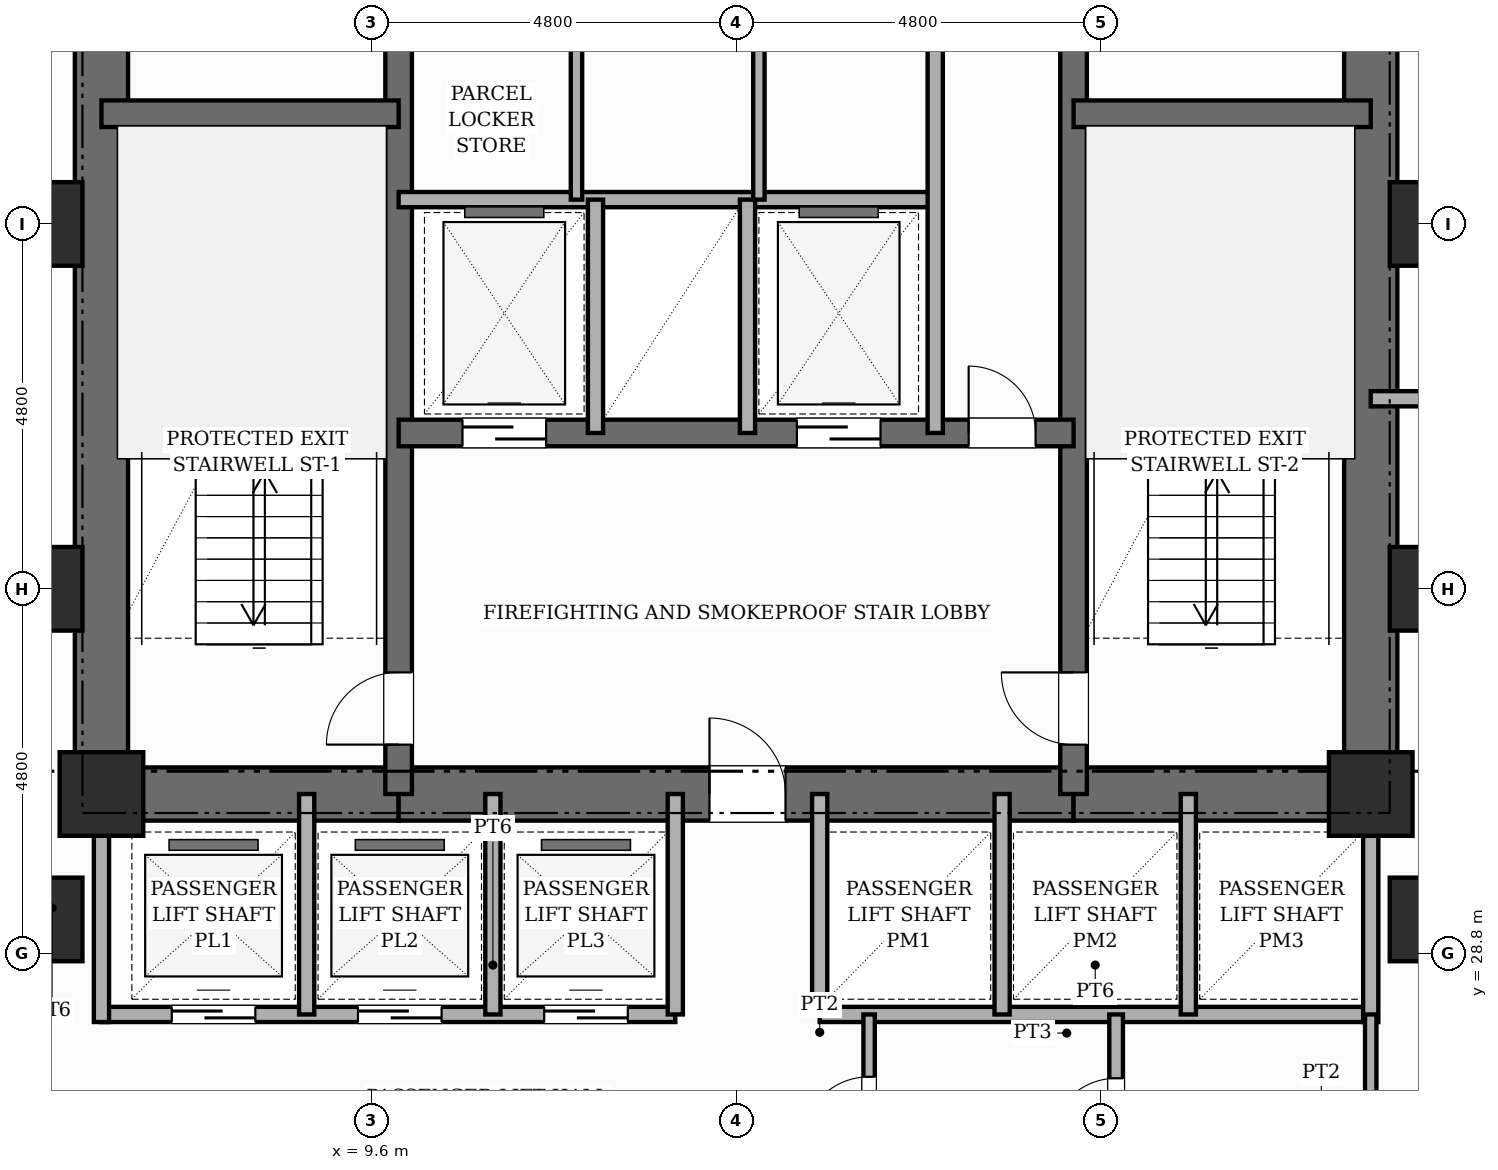
"""IFC4 building model, lengths in metres.
Left out: names, types, materials, properties, quantities, classifications, styles, units other than length and angle.
Written with IfcOpenShell. Run it as: python <this file> out.ifc"""

import sys

from ifc_helpers import new_model, si_unit, direction, frame, frame_2d, origin, origin_2d, place, context, subcontext, project, spatial, rectangle, extrude, element, fill, save


model = new_model("IFC4")
c1 = context("Model", 3, precision=1e-05, world=origin(), true_north=direction((0.0, 1.0)))
c2 = subcontext(c1, "Body", "Model", "MODEL_VIEW")
j1 = project(units=[si_unit("LENGTHUNIT", "METRE"), si_unit("PLANEANGLEUNIT", "RADIAN")], contexts=[c1])
p1 = place(None, origin())
s1 = spatial("IfcSite", under=j1, at=p1, CompositionType="ELEMENT")
p2 = place(p1, origin())
s2 = spatial("IfcBuilding", under=s1, at=p2, CompositionType="ELEMENT")
p3 = place(p2, frame((0.0, 0.0, 25.0)))
s3 = spatial("IfcBuildingStorey", under=s2, at=p3, CompositionType="ELEMENT", Elevation=25.0)
p4 = place(p3, frame((6.05, 30.55, 0.0), z_axis=(0.0, 0.0, 1.0), x_axis=(0.0, 1.0, 0.0)))
e1 = element("IfcWall", 1, at=p4, inside=s3, PredefinedType="SHEAR", context=c2, shape_type="SweptSolid", body=[
    extrude(rectangle(XDim=15.6, YDim=0.7, at=frame_2d((7.8, 0.0))), origin(), (0.0, 0.0, 1.0), 3.6),
])
p5 = place(p3, frame((22.75, 30.55, 0.0), z_axis=(0.0, 0.0, 1.0), x_axis=(0.0, 1.0, 0.0)))
e2 = element("IfcWall", 2, at=p5, inside=s3, PredefinedType="SHEAR", context=c2, shape_type="SweptSolid", body=[
    extrude(rectangle(XDim=15.6, YDim=0.7, at=frame_2d((7.8, 0.0))), origin(), (0.0, 0.0, 1.0), 3.6),
])
p6 = place(p5, frame((10.8, 0.0, 0.0)))
e3 = element("IfcOpeningElement", 3, at=p6, cuts=e2, PredefinedType="OPENING", context=c2, shape_type="SweptSolid", body=[
    extrude(rectangle(XDim=1.0, YDim=2.15, at=frame_2d((0.5, 1.075))), frame((0.0, 0.36, 0.0), z_axis=(0.0, -1.0, 0.0), x_axis=(1.0, 0.0, 0.0)), (0.0, 0.0, 1.0), 0.72),
])
p7 = place(p3, frame((6.05, 30.9, 0.0), z_axis=(0.0, 0.0, 1.0), x_axis=(1.0, 0.0, 0.0)))
e4 = element("IfcWall", 4, at=p7, inside=s3, PredefinedType="SHEAR", context=c2, shape_type="SweptSolid", body=[
    extrude(rectangle(XDim=3.91, YDim=0.7, at=frame_2d((1.955, 0.0))), origin(), (0.0, 0.0, 1.0), 3.6),
])
p8 = place(p3, frame((9.96, 30.9, 0.0), z_axis=(0.0, 0.0, 1.0), x_axis=(1.0, 0.0, 0.0)))
e5 = element("IfcWall", 5, at=p8, inside=s3, PredefinedType="SHEAR", context=c2, shape_type="SweptSolid", body=[
    extrude(rectangle(XDim=8.88, YDim=0.7, at=frame_2d((4.44, 0.0))), origin(), (0.0, 0.0, 1.0), 3.6),
])
p9 = place(p8, frame((4.09, 0.0, 0.0)))
e6 = element("IfcOpeningElement", 6, at=p9, cuts=e5, PredefinedType="OPENING", context=c2, shape_type="SweptSolid", body=[
    extrude(rectangle(XDim=1.0, YDim=2.15, at=frame_2d((0.5, 1.075))), frame((0.0, 0.36, 0.0), z_axis=(0.0, -1.0, 0.0), x_axis=(1.0, 0.0, 0.0)), (0.0, 0.0, 1.0), 0.72),
])
p10 = place(p3, frame((18.84, 30.9, 0.0), z_axis=(0.0, 0.0, 1.0), x_axis=(1.0, 0.0, 0.0)))
e7 = element("IfcWall", 7, at=p10, inside=s3, PredefinedType="SHEAR", context=c2, shape_type="SweptSolid", body=[
    extrude(rectangle(XDim=3.91, YDim=0.7, at=frame_2d((1.955, 0.0))), origin(), (0.0, 0.0, 1.0), 3.6),
])
p11 = place(p3, frame((9.96, 30.9, 0.0), z_axis=(0.0, 0.0, 1.0), x_axis=(0.0, 1.0, 0.0)))
e8 = element("IfcWall", 8, at=p11, inside=s3, PredefinedType="SHEAR", context=c2, shape_type="SweptSolid", body=[
    extrude(rectangle(XDim=14.9, YDim=0.35, at=frame_2d((7.45, 0.0))), origin(), (0.0, 0.0, 1.0), 3.6),
])
p12 = place(p11, frame((0.65, 0.0, 0.0)))
e9 = element("IfcOpeningElement", 9, at=p12, cuts=e8, PredefinedType="OPENING", context=c2, shape_type="SweptSolid", body=[
    extrude(rectangle(XDim=0.95, YDim=2.1, at=frame_2d((0.475, 1.05))), frame((0.0, 0.185, 0.0), z_axis=(0.0, -1.0, 0.0), x_axis=(1.0, 0.0, 0.0)), (0.0, 0.0, 1.0), 0.37),
])
p13 = place(p11, frame((10.45, 0.0, 0.0)))
e10 = element("IfcOpeningElement", 10, at=p13, cuts=e8, PredefinedType="OPENING", context=c2, shape_type="SweptSolid", body=[
    extrude(rectangle(XDim=1.0, YDim=2.15, at=frame_2d((0.5, 1.075))), frame((0.0, 0.185, 0.0), z_axis=(0.0, -1.0, 0.0), x_axis=(1.0, 0.0, 0.0)), (0.0, 0.0, 1.0), 0.37),
])
p14 = place(p3, frame((18.84, 30.9, 0.0), z_axis=(0.0, 0.0, 1.0), x_axis=(0.0, 1.0, 0.0)))
e11 = element("IfcWall", 11, at=p14, inside=s3, PredefinedType="SHEAR", context=c2, shape_type="SweptSolid", body=[
    extrude(rectangle(XDim=14.9, YDim=0.35, at=frame_2d((7.45, 0.0))), origin(), (0.0, 0.0, 1.0), 3.6),
])
p15 = place(p14, frame((0.65, 0.0, 0.0)))
e12 = element("IfcOpeningElement", 12, at=p15, cuts=e11, PredefinedType="OPENING", context=c2, shape_type="SweptSolid", body=[
    extrude(rectangle(XDim=0.95, YDim=2.1, at=frame_2d((0.475, 1.05))), frame((0.0, 0.185, 0.0), z_axis=(0.0, -1.0, 0.0), x_axis=(1.0, 0.0, 0.0)), (0.0, 0.0, 1.0), 0.37),
])
p16 = place(p14, frame((10.45, 0.0, 0.0)))
e13 = element("IfcOpeningElement", 13, at=p16, cuts=e11, PredefinedType="OPENING", context=c2, shape_type="SweptSolid", body=[
    extrude(rectangle(XDim=1.0, YDim=2.15, at=frame_2d((0.5, 1.075))), frame((0.0, 0.185, 0.0), z_axis=(0.0, -1.0, 0.0), x_axis=(1.0, 0.0, 0.0)), (0.0, 0.0, 1.0), 0.37),
])
for number, where, z_axis, x_axis in (
    (14, (6.05, 39.85, 0.0), (0.0, 0.0, 1.0), (1.0, 0.0, 0.0)),
    (15, (18.84, 39.85, 0.0), (0.0, 0.0, 1.0), (1.0, 0.0, 0.0)),
):
    element("IfcWall", number, at=place(p3, frame(where, z_axis=z_axis, x_axis=x_axis)), inside=s3, PredefinedType="SHEAR", context=c2, shape_type="SweptSolid", body=[
        extrude(rectangle(XDim=3.91, YDim=0.35, at=frame_2d((1.955, 0.0))), origin(), (0.0, 0.0, 1.0), 3.6),
    ])
p17 = place(p3, frame((9.96, 35.65, 0.0), z_axis=(0.0, 0.0, 1.0), x_axis=(1.0, 0.0, 0.0)))
e16 = element("IfcWall", 16, at=p17, inside=s3, PredefinedType="SHEAR", context=c2, shape_type="SweptSolid", body=[
    extrude(rectangle(XDim=8.88, YDim=0.35, at=frame_2d((4.44, 0.0))), origin(), (0.0, 0.0, 1.0), 3.6),
])
p18 = place(p17, frame((0.84, 0.0, 0.0)))
e17 = element("IfcOpeningElement", 17, at=p18, cuts=e16, PredefinedType="OPENING", context=c2, shape_type="SweptSolid", body=[
    extrude(rectangle(XDim=1.1, YDim=2.15, at=frame_2d((0.55, 1.075))), frame((0.0, 0.185, 0.0), z_axis=(0.0, -1.0, 0.0), x_axis=(1.0, 0.0, 0.0)), (0.0, 0.0, 1.0), 0.37),
])
p19 = place(p17, frame((5.24, 0.0, 0.0)))
e18 = element("IfcOpeningElement", 18, at=p19, cuts=e16, PredefinedType="OPENING", context=c2, shape_type="SweptSolid", body=[
    extrude(rectangle(XDim=1.1, YDim=2.15, at=frame_2d((0.55, 1.075))), frame((0.0, 0.185, 0.0), z_axis=(0.0, -1.0, 0.0), x_axis=(1.0, 0.0, 0.0)), (0.0, 0.0, 1.0), 0.37),
])
p20 = place(p17, frame((7.5, 0.0, 0.0)))
e19 = element("IfcOpeningElement", 19, at=p20, cuts=e16, PredefinedType="OPENING", context=c2, shape_type="SweptSolid", body=[
    extrude(rectangle(XDim=0.88, YDim=2.1, at=frame_2d((0.44, 1.05))), frame((0.0, 0.185, 0.0), z_axis=(0.0, -1.0, 0.0), x_axis=(1.0, 0.0, 0.0)), (0.0, 0.0, 1.0), 0.37),
])
for number, where, z_axis, x_axis in (
    (20, (5.25, 29.25, 0.0), (0.0, 0.0, 1.0), (1.0, 0.0, 0.0)),
    (21, (5.25, 33.6, 0.0), (0.0, 0.0, 1.0), (1.0, 0.0, 0.0)),
    (22, (5.25, 38.4, 0.0), (0.0, 0.0, 1.0), (1.0, 0.0, 0.0)),
    (23, (6.05, 30.9, 0.0), (0.0, 0.0, 1.0), (1.0, 0.0, 0.0)),
    (24, (22.75, 30.9, 0.0), (0.0, 0.0, 1.0), (1.0, 0.0, 0.0)),
    (25, (23.55, 29.25, 0.0), (0.0, 0.0, 1.0), (1.0, 0.0, 0.0)),
    (26, (23.55, 33.6, 0.0), (0.0, 0.0, 1.0), (1.0, 0.0, 0.0)),
    (27, (23.55, 38.4, 0.0), (0.0, 0.0, 1.0), (1.0, 0.0, 0.0)),
):
    element("IfcColumn", number, at=place(p3, frame(where, z_axis=z_axis, x_axis=x_axis)), inside=s3, PredefinedType="COLUMN", context=c2, shape_type="SweptSolid", body=[
        extrude(rectangle(XDim=1.1, YDim=1.1, at=origin_2d()), origin(), (0.0, 0.0, 1.0), 3.6),
    ])
p21 = place(p3, frame((9.96, 38.72, 0.0), z_axis=(0.0, 0.0, 1.0), x_axis=(1.0, 0.0, 0.0)))
e28 = element("IfcWall", 28, at=p21, inside=s3, PredefinedType="POLYGONAL", context=c2, shape_type="SweptSolid", body=[
    extrude(rectangle(XDim=7.06, YDim=0.2, at=frame_2d((3.53, 0.0))), origin(), (0.0, 0.0, 1.0), 3.35),
])
for number, where, z_axis, x_axis in (
    (29, (12.55, 35.65, 0.0), (0.0, 0.0, 1.0), (0.0, 1.0, 0.0)),
    (30, (14.55, 35.65, 0.0), (0.0, 0.0, 1.0), (0.0, 1.0, 0.0)),
):
    element("IfcWall", number, at=place(p3, frame(where, z_axis=z_axis, x_axis=x_axis)), inside=s3, PredefinedType="POLYGONAL", context=c2, shape_type="SweptSolid", body=[
        extrude(rectangle(XDim=3.07, YDim=0.2, at=frame_2d((1.535, 0.0))), origin(), (0.0, 0.0, 1.0), 3.35),
    ])
p22 = place(p3, frame((17.02, 35.65, 0.0), z_axis=(0.0, 0.0, 1.0), x_axis=(0.0, 1.0, 0.0)))
e31 = element("IfcWall", 31, at=p22, inside=s3, PredefinedType="POLYGONAL", context=c2, shape_type="SweptSolid", body=[
    extrude(rectangle(XDim=5.15, YDim=0.2, at=frame_2d((2.575, 0.0))), origin(), (0.0, 0.0, 1.0), 3.35),
])
for number, where, z_axis, x_axis in (
    (32, (12.3, 38.72, 0.0), (0.0, 0.0, 1.0), (0.0, 1.0, 0.0)),
    (33, (14.7, 38.72, 0.0), (0.0, 0.0, 1.0), (0.0, 1.0, 0.0)),
):
    element("IfcWall", number, at=place(p3, frame(where, z_axis=z_axis, x_axis=x_axis)), inside=s3, PredefinedType="PARTITIONING", context=c2, shape_type="SweptSolid", body=[
        extrude(rectangle(XDim=2.08, YDim=0.15, at=frame_2d((1.04, 0.0))), origin(), (0.0, 0.0, 1.0), 3.35),
    ])
p23 = place(p3, frame((6.05, 28.0, 0.0), z_axis=(0.0, 0.0, 1.0), x_axis=(1.0, 0.0, 0.0)))
e34 = element("IfcWall", 34, at=p23, inside=s3, PredefinedType="POLYGONAL", context=c2, shape_type="SweptSolid", body=[
    extrude(rectangle(XDim=7.55, YDim=0.2, at=frame_2d((3.775, 0.0))), origin(), (0.0, 0.0, 1.0), 3.35),
])
p24 = place(p23, frame((0.925, 0.0, 0.0)))
e35 = element("IfcOpeningElement", 35, at=p24, cuts=e34, PredefinedType="OPENING", context=c2, shape_type="SweptSolid", body=[
    extrude(rectangle(XDim=1.1, YDim=2.15, at=frame_2d((0.55, 1.075))), frame((0.0, 0.11, 0.0), z_axis=(0.0, -1.0, 0.0), x_axis=(1.0, 0.0, 0.0)), (0.0, 0.0, 1.0), 0.22),
])
p25 = place(p23, frame((3.375, 0.0, 0.0)))
e36 = element("IfcOpeningElement", 36, at=p25, cuts=e34, PredefinedType="OPENING", context=c2, shape_type="SweptSolid", body=[
    extrude(rectangle(XDim=1.1, YDim=2.15, at=frame_2d((0.55, 1.075))), frame((0.0, 0.11, 0.0), z_axis=(0.0, -1.0, 0.0), x_axis=(1.0, 0.0, 0.0)), (0.0, 0.0, 1.0), 0.22),
])
p26 = place(p23, frame((5.825, 0.0, 0.0)))
e37 = element("IfcOpeningElement", 37, at=p26, cuts=e34, PredefinedType="OPENING", context=c2, shape_type="SweptSolid", body=[
    extrude(rectangle(XDim=1.1, YDim=2.15, at=frame_2d((0.55, 1.075))), frame((0.0, 0.11, 0.0), z_axis=(0.0, -1.0, 0.0), x_axis=(1.0, 0.0, 0.0)), (0.0, 0.0, 1.0), 0.22),
])
p27 = place(p3, frame((15.5, 28.0, 0.0), z_axis=(0.0, 0.0, 1.0), x_axis=(1.0, 0.0, 0.0)))
e38 = element("IfcWall", 38, at=p27, inside=s3, PredefinedType="POLYGONAL", context=c2, shape_type="SweptSolid", body=[
    extrude(rectangle(XDim=7.25, YDim=0.2, at=frame_2d((3.625, 0.0))), origin(), (0.0, 0.0, 1.0), 3.35),
])
for number, where, z_axis, x_axis in (
    (39, (6.05, 27.9, 0.0), (0.0, 0.0, 1.0), (0.0, 1.0, 0.0)),
    (40, (22.75, 27.9, 0.0), (0.0, 0.0, 1.0), (0.0, 1.0, 0.0)),
):
    element("IfcWall", number, at=place(p3, frame(where, z_axis=z_axis, x_axis=x_axis)), inside=s3, PredefinedType="POLYGONAL", context=c2, shape_type="SweptSolid", body=[
        extrude(rectangle(XDim=3.0, YDim=0.2, at=frame_2d((1.5, 0.0))), origin(), (0.0, 0.0, 1.0), 3.35),
    ])
for number, where, z_axis, x_axis in (
    (41, (13.6, 28.0, 0.0), (0.0, 0.0, 1.0), (0.0, 1.0, 0.0)),
    (42, (15.5, 28.0, 0.0), (0.0, 0.0, 1.0), (0.0, 1.0, 0.0)),
    (43, (8.75, 28.0, 0.0), (0.0, 0.0, 1.0), (0.0, 1.0, 0.0)),
    (44, (11.2, 28.0, 0.0), (0.0, 0.0, 1.0), (0.0, 1.0, 0.0)),
    (45, (17.9, 28.0, 0.0), (0.0, 0.0, 1.0), (0.0, 1.0, 0.0)),
    (46, (20.35, 28.0, 0.0), (0.0, 0.0, 1.0), (0.0, 1.0, 0.0)),
):
    element("IfcWall", number, at=place(p3, frame(where, z_axis=z_axis, x_axis=x_axis)), inside=s3, PredefinedType="POLYGONAL", context=c2, shape_type="SweptSolid", body=[
        extrude(rectangle(XDim=2.9, YDim=0.2, at=frame_2d((1.45, 0.0))), origin(), (0.0, 0.0, 1.0), 3.35),
    ])
p28 = place(p3, frame((16.15, 25.75, 0.0), z_axis=(0.0, 0.0, 1.0), x_axis=(0.0, 1.0, 0.0)))
e47 = element("IfcWall", 47, at=p28, inside=s3, PredefinedType="PARTITIONING", context=c2, shape_type="SweptSolid", body=[
    extrude(rectangle(XDim=2.25, YDim=0.15, at=frame_2d((1.125, 0.0))), origin(), (0.0, 0.0, 1.0), 3.35),
])
p29 = place(p28, frame((0.55, 0.0, 0.0)))
e48 = element("IfcOpeningElement", 48, at=p29, cuts=e47, PredefinedType="OPENING", context=c2, shape_type="SweptSolid", body=[
    extrude(rectangle(XDim=0.88, YDim=2.1, at=frame_2d((0.44, 1.05))), frame((0.0, 0.085, 0.0), z_axis=(0.0, -1.0, 0.0), x_axis=(1.0, 0.0, 0.0)), (0.0, 0.0, 1.0), 0.17),
])
p30 = place(p3, frame((22.75, 25.75, 0.0), z_axis=(0.0, 0.0, 1.0), x_axis=(0.0, 1.0, 0.0)))
e49 = element("IfcWall", 49, at=p30, inside=s3, PredefinedType="PARTITIONING", context=c2, shape_type="SweptSolid", body=[
    extrude(rectangle(XDim=2.25, YDim=0.15, at=frame_2d((1.125, 0.0))), origin(), (0.0, 0.0, 1.0), 3.35),
])
p31 = place(p3, frame((19.4, 25.75, 0.0), z_axis=(0.0, 0.0, 1.0), x_axis=(0.0, 1.0, 0.0)))
e50 = element("IfcWall", 50, at=p31, inside=s3, PredefinedType="PLUMBINGWALL", context=c2, shape_type="SweptSolid", body=[
    extrude(rectangle(XDim=2.25, YDim=0.18, at=frame_2d((1.125, 0.0))), origin(), (0.0, 0.0, 1.0), 3.35),
])
p32 = place(p31, frame((0.55, 0.0, 0.0)))
e51 = element("IfcOpeningElement", 51, at=p32, cuts=e50, PredefinedType="OPENING", context=c2, shape_type="SweptSolid", body=[
    extrude(rectangle(XDim=0.86, YDim=2.1, at=frame_2d((0.43, 1.05))), frame((0.0, 0.1, 0.0), z_axis=(0.0, -1.0, 0.0), x_axis=(1.0, 0.0, 0.0)), (0.0, 0.0, 1.0), 0.2),
])
p33 = place(p3, frame((22.75, 36.1, 0.0), z_axis=(0.0, 0.0, 1.0), x_axis=(1.0, 0.0, 0.0)))
e52 = element("IfcWall", 52, at=p33, inside=s3, PredefinedType="PARTITIONING", context=c2, shape_type="SweptSolid", body=[
    extrude(rectangle(XDim=21.27, YDim=0.2, at=frame_2d((10.635, 0.0))), origin(), (0.0, 0.0, 1.0), 3.35),
])
p34 = place(p33, frame((1.628, 0.0, 0.0)))
e53 = element("IfcOpeningElement", 53, at=p34, cuts=e52, PredefinedType="OPENING", context=c2, shape_type="SweptSolid", body=[
    extrude(rectangle(XDim=0.98, YDim=2.18, at=frame_2d((0.49, 1.09))), frame((0.0, 0.11, 0.0), z_axis=(0.0, -1.0, 0.0), x_axis=(1.0, 0.0, 0.0)), (0.0, 0.0, 1.0), 0.22),
])
p35 = place(p33, frame((14.725, 0.0, 0.0)))
e54 = element("IfcOpeningElement", 54, at=p35, cuts=e52, PredefinedType="OPENING", context=c2, shape_type="SweptSolid", body=[
    extrude(rectangle(XDim=0.98, YDim=2.18, at=frame_2d((0.49, 1.09))), frame((0.0, 0.11, 0.0), z_axis=(0.0, -1.0, 0.0), x_axis=(1.0, 0.0, 0.0)), (0.0, 0.0, 1.0), 0.22),
])
p36 = place(p12, origin())
e55 = element("IfcDoor", 55, at=p36, inside=s3, OperationType="SINGLE_SWING_LEFT", PredefinedType="DOOR", context=c2, shape_type="SweptSolid", body=[
    extrude(rectangle(XDim=0.95, YDim=2.1, at=frame_2d((0.475, 1.05))), frame((0.0, 0.025, 0.0), z_axis=(0.0, -1.0, 0.0), x_axis=(1.0, 0.0, 0.0)), (0.0, 0.0, 1.0), 0.05),
])
fill(e9, e55)
p37 = place(p15, origin())
e56 = element("IfcDoor", 56, at=p37, inside=s3, OperationType="SINGLE_SWING_RIGHT", PredefinedType="DOOR", context=c2, shape_type="SweptSolid", body=[
    extrude(rectangle(XDim=0.95, YDim=2.1, at=frame_2d((0.475, 1.05))), frame((0.0, 0.025, 0.0), z_axis=(0.0, -1.0, 0.0), x_axis=(1.0, 0.0, 0.0)), (0.0, 0.0, 1.0), 0.05),
])
fill(e12, e56)
p38 = place(p9, origin())
e57 = element("IfcDoor", 57, at=p38, inside=s3, OperationType="SINGLE_SWING_LEFT", PredefinedType="DOOR", context=c2, shape_type="SweptSolid", body=[
    extrude(rectangle(XDim=1.0, YDim=2.15, at=frame_2d((0.5, 1.075))), frame((0.0, 0.025, 0.0), z_axis=(0.0, -1.0, 0.0), x_axis=(1.0, 0.0, 0.0)), (0.0, 0.0, 1.0), 0.05),
])
fill(e6, e57)
p39 = place(p18, origin())
e58 = element("IfcDoor", 58, at=p39, inside=s3, OperationType="SLIDING_TO_LEFT", PredefinedType="DOOR", context=c2, shape_type="SweptSolid", body=[
    extrude(rectangle(XDim=1.1, YDim=2.15, at=frame_2d((0.55, 1.075))), frame((0.0, 0.025, 0.0), z_axis=(0.0, -1.0, 0.0), x_axis=(1.0, 0.0, 0.0)), (0.0, 0.0, 1.0), 0.05),
])
fill(e17, e58)
p40 = place(p19, origin())
e59 = element("IfcDoor", 59, at=p40, inside=s3, OperationType="SLIDING_TO_RIGHT", PredefinedType="DOOR", context=c2, shape_type="SweptSolid", body=[
    extrude(rectangle(XDim=1.1, YDim=2.15, at=frame_2d((0.55, 1.075))), frame((0.0, 0.025, 0.0), z_axis=(0.0, -1.0, 0.0), x_axis=(1.0, 0.0, 0.0)), (0.0, 0.0, 1.0), 0.05),
])
fill(e18, e59)
p41 = place(p20, origin())
e60 = element("IfcDoor", 60, at=p41, inside=s3, OperationType="SINGLE_SWING_LEFT", PredefinedType="DOOR", context=c2, shape_type="SweptSolid", body=[
    extrude(rectangle(XDim=0.88, YDim=2.1, at=frame_2d((0.44, 1.05))), frame((0.0, 0.025, 0.0), z_axis=(0.0, -1.0, 0.0), x_axis=(1.0, 0.0, 0.0)), (0.0, 0.0, 1.0), 0.05),
])
fill(e19, e60)
p42 = place(p24, origin())
e61 = element("IfcDoor", 61, at=p42, inside=s3, OperationType="SLIDING_TO_LEFT", PredefinedType="DOOR", context=c2, shape_type="SweptSolid", body=[
    extrude(rectangle(XDim=1.1, YDim=2.15, at=frame_2d((0.55, 1.075))), frame((0.0, 0.025, 0.0), z_axis=(0.0, -1.0, 0.0), x_axis=(1.0, 0.0, 0.0)), (0.0, 0.0, 1.0), 0.05),
])
fill(e35, e61)
p43 = place(p25, origin())
e62 = element("IfcDoor", 62, at=p43, inside=s3, OperationType="SLIDING_TO_RIGHT", PredefinedType="DOOR", context=c2, shape_type="SweptSolid", body=[
    extrude(rectangle(XDim=1.1, YDim=2.15, at=frame_2d((0.55, 1.075))), frame((0.0, 0.025, 0.0), z_axis=(0.0, -1.0, 0.0), x_axis=(1.0, 0.0, 0.0)), (0.0, 0.0, 1.0), 0.05),
])
fill(e36, e62)
p44 = place(p26, origin())
e63 = element("IfcDoor", 63, at=p44, inside=s3, OperationType="SLIDING_TO_LEFT", PredefinedType="DOOR", context=c2, shape_type="SweptSolid", body=[
    extrude(rectangle(XDim=1.1, YDim=2.15, at=frame_2d((0.55, 1.075))), frame((0.0, 0.025, 0.0), z_axis=(0.0, -1.0, 0.0), x_axis=(1.0, 0.0, 0.0)), (0.0, 0.0, 1.0), 0.05),
])
fill(e37, e63)
p45 = place(p29, origin())
e64 = element("IfcDoor", 64, at=p45, inside=s3, OperationType="SINGLE_SWING_LEFT", PredefinedType="DOOR", context=c2, shape_type="SweptSolid", body=[
    extrude(rectangle(XDim=0.88, YDim=2.1, at=frame_2d((0.44, 1.05))), frame((0.0, 0.025, 0.0), z_axis=(0.0, -1.0, 0.0), x_axis=(1.0, 0.0, 0.0)), (0.0, 0.0, 1.0), 0.05),
])
fill(e48, e64)
p46 = place(p32, origin())
e65 = element("IfcDoor", 65, at=p46, inside=s3, OperationType="SINGLE_SWING_LEFT", PredefinedType="DOOR", context=c2, shape_type="SweptSolid", body=[
    extrude(rectangle(XDim=0.86, YDim=2.1, at=frame_2d((0.43, 1.05))), frame((0.0, 0.025, 0.0), z_axis=(0.0, -1.0, 0.0), x_axis=(1.0, 0.0, 0.0)), (0.0, 0.0, 1.0), 0.05),
])
fill(e51, e65)
save(model, sys.argv[1])
